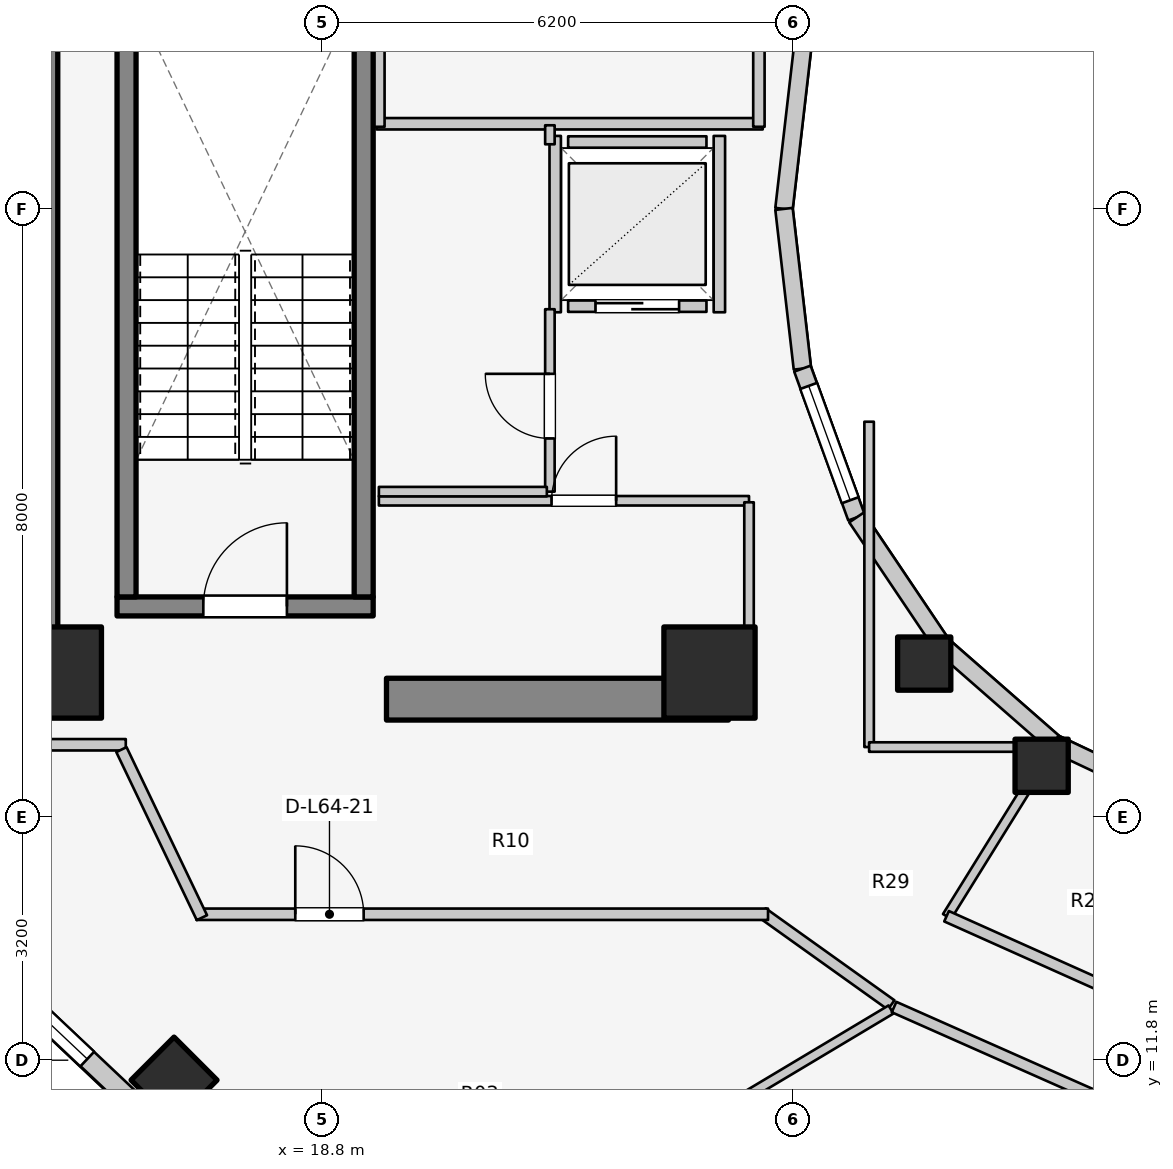
"""IFC4 building model, lengths in metres.
Left out: names, types, materials, properties, quantities, classifications, styles, units other than length and angle.
Written with IfcOpenShell. Run it as: python <this file> out.ifc"""

import sys

from ifc_helpers import new_model, si_unit, direction, frame, frame_2d, origin, origin_2d, place, context, subcontext, project, spatial, rectangle, extrude, element, fill, save


model = new_model("IFC4")
c1 = context("Model", 3, precision=1e-05, world=origin(), true_north=direction((0.0, 1.0)))
c2 = subcontext(c1, "Body", "Model", "MODEL_VIEW")
j1 = project(units=[si_unit("LENGTHUNIT", "METRE"), si_unit("PLANEANGLEUNIT", "RADIAN")], contexts=[c1])
p1 = place(None, origin())
s1 = spatial("IfcSite", under=j1, at=p1, CompositionType="ELEMENT")
p2 = place(p1, origin())
s2 = spatial("IfcBuilding", under=s1, at=p2, CompositionType="ELEMENT")
p3 = place(p2, frame((0.0, 0.0, 210.9)))
s3 = spatial("IfcBuildingStorey", under=s2, at=p3, CompositionType="ELEMENT", Elevation=210.9)
p4 = place(p3, frame((15.05, 17.05, 0.0), z_axis=(0.0, 0.0, 1.0), x_axis=(0.0, 1.0, 0.0)))
e1 = element("IfcWall", 1, at=p4, inside=s3, PredefinedType="SHEAR", context=c2, shape_type="SweptSolid", body=[
    extrude(rectangle(XDim=12.8, YDim=0.55, at=frame_2d((6.4, 0.0))), origin(), (0.0, 0.0, 1.0), 3.1),
])
p5 = place(p3, frame((19.65, 16.55, 0.0), z_axis=(0.0, 0.0, 1.0), x_axis=(1.0, 0.0, 0.0)))
e2 = element("IfcWall", 2, at=p5, inside=s3, PredefinedType="SHEAR", context=c2, shape_type="SweptSolid", body=[
    extrude(rectangle(XDim=4.5, YDim=0.55, at=frame_2d((2.25, 0.0))), origin(), (0.0, 0.0, 1.0), 3.1),
])
p6 = place(p3, frame((16.105, 17.77, 0.0), z_axis=(0.0, 0.0, 1.0), x_axis=(1.0, 0.0, 0.0)))
e3 = element("IfcWall", 3, at=p6, inside=s3, PredefinedType="SOLIDWALL", context=c2, shape_type="SweptSolid", body=[
    extrude(rectangle(XDim=3.37, YDim=0.25, at=frame_2d((1.685, 0.0))), origin(), (0.0, 0.0, 1.0), 3.1),
])
p7 = place(p6, frame((1.135, 0.0, 0.0)))
e4 = element("IfcOpeningElement", 4, at=p7, cuts=e3, PredefinedType="OPENING", context=c2, shape_type="SweptSolid", body=[
    extrude(rectangle(XDim=1.1, YDim=2.1, at=frame_2d((0.55, 1.05))), frame((0.0, 0.135, 0.0), z_axis=(0.0, -1.0, 0.0), x_axis=(1.0, 0.0, 0.0)), (0.0, 0.0, 1.0), 0.27),
])
for number, where, z_axis, x_axis in (
    (5, (16.23, 17.895, 0.0), (0.0, 0.0, 1.0), (0.0, 1.0, 0.0)),
    (6, (19.35, 17.895, 0.0), (0.0, 0.0, 1.0), (0.0, 1.0, 0.0)),
):
    element("IfcWall", number, at=place(p3, frame(where, z_axis=z_axis, x_axis=x_axis)), inside=s3, PredefinedType="SOLIDWALL", context=c2, shape_type="SweptSolid", body=[
        extrude(rectangle(XDim=7.81, YDim=0.25, at=frame_2d((3.905, 0.0))), origin(), (0.0, 0.0, 1.0), 3.1),
    ])
for number, where, z_axis, x_axis in (
    (7, (15.3, 16.9, 0.0), (0.0, 0.0, 1.0), (1.0, 0.0, 0.0)),
    (8, (23.9, 16.9, 0.0), (0.0, 0.0, 1.0), (1.0, 0.0, 0.0)),
):
    element("IfcColumn", number, at=place(p3, frame(where, z_axis=z_axis, x_axis=x_axis)), inside=s3, PredefinedType="COLUMN", context=c2, shape_type="SweptSolid", body=[
        extrude(rectangle(XDim=1.2, YDim=1.2, at=origin_2d()), origin(), (0.0, 0.0, 1.0), 3.1),
    ])
p8 = place(p3, frame((26.725, 17.018, 0.0), z_axis=(0.0, 0.0, 1.0), x_axis=(1.0, 0.0, 0.0)))
e9 = element("IfcColumn", 9, at=p8, inside=s3, PredefinedType="COLUMN", context=c2, shape_type="SweptSolid", body=[
    extrude(rectangle(XDim=0.7, YDim=0.7, at=origin_2d()), origin(), (0.0, 0.0, 1.0), 3.1),
])
p9 = place(p3, frame((16.855, 11.538, 0.0), z_axis=(0.0, 0.0, 1.0), x_axis=(-0.707106781187, -0.707106781187, 0.0)))
e10 = element("IfcColumn", 10, at=p9, inside=s3, PredefinedType="COLUMN", context=c2, shape_type="SweptSolid", body=[
    extrude(rectangle(XDim=0.8, YDim=0.8, at=origin_2d()), origin(), (0.0, 0.0, 1.0), 3.1),
])
p10 = place(p3, frame((28.27, 15.673, 0.0), z_axis=(0.0, 0.0, 1.0), x_axis=(1.0, 0.0, 0.0)))
e11 = element("IfcColumn", 11, at=p10, inside=s3, PredefinedType="COLUMN", context=c2, shape_type="SweptSolid", body=[
    extrude(rectangle(XDim=0.7, YDim=0.7, at=origin_2d()), origin(), (0.0, 0.0, 1.0), 3.1),
])
for number, where, z_axis, x_axis in (
    (12, (25.123, 25.102, 0.0), (0.0, 0.0, 1.0), (-0.115, -0.993, 0.0)),
    (13, (24.88, 23.0, 0.0), (0.0, 0.0, 1.0), (0.115, -0.993, 0.0)),
):
    element("IfcWall", number, at=place(p3, frame(where, z_axis=z_axis, x_axis=x_axis)), inside=s3, PredefinedType="STANDARD", context=c2, shape_type="SweptSolid", body=[
        extrude(rectangle(XDim=2.115, YDim=0.23, at=frame_2d((1.058, 0.0))), origin(), (0.0, 0.0, 1.0), 2.84),
    ])
p11 = place(p3, frame((25.123, 20.898, 0.0), z_axis=(0.0, 0.0, 1.0), x_axis=(0.341423187295, -0.93990968033, 0.0)))
e14 = element("IfcWall", 14, at=p11, inside=s3, PredefinedType="STANDARD", context=c2, shape_type="SweptSolid", body=[
    extrude(rectangle(XDim=2.084, YDim=0.23, at=frame_2d((1.042, 0.0))), origin(), (0.0, 0.0, 1.0), 2.84),
])
p12 = place(p11, frame((0.242, 0.0, 0.85)))
e15 = element("IfcOpeningElement", 15, at=p12, cuts=e14, PredefinedType="OPENING", context=c2, shape_type="SweptSolid", body=[
    extrude(rectangle(XDim=1.6, YDim=1.65, at=frame_2d((0.8, 0.825))), frame((0.0, 0.125, 0.0), z_axis=(0.0, -1.0, 0.0), x_axis=(1.0, 0.0, 0.0)), (0.0, 0.0, 1.0), 0.25),
])
p13 = place(p3, frame((25.834, 18.94, 0.0), z_axis=(0.0, 0.0, 1.0), x_axis=(0.558197800898, -0.829707909492, 0.0)))
e16 = element("IfcWall", 16, at=p13, inside=s3, PredefinedType="STANDARD", context=c2, shape_type="SweptSolid", body=[
    extrude(rectangle(XDim=2.027, YDim=0.23, at=frame_2d((1.013, 0.0))), origin(), (0.0, 0.0, 1.0), 2.16),
])
p14 = place(p3, frame((26.965, 17.258, 0.0), z_axis=(0.0, 0.0, 1.0), x_axis=(0.752576694707, -0.658504607869, 0.0)))
e17 = element("IfcWall", 17, at=p14, inside=s3, PredefinedType="STANDARD", context=c2, shape_type="SweptSolid", body=[
    extrude(rectangle(XDim=1.959, YDim=0.23, at=frame_2d((0.98, 0.0))), origin(), (0.0, 0.0, 1.0), 2.16),
])
p15 = place(p3, frame((28.44, 15.968, 0.0), z_axis=(0.0, 0.0, 1.0), x_axis=(0.904179699603, -0.427152280606, 0.0)))
e18 = element("IfcWall", 18, at=p15, inside=s3, PredefinedType="STANDARD", context=c2, shape_type="SweptSolid", body=[
    extrude(rectangle(XDim=1.899, YDim=0.23, at=frame_2d((0.95, 0.0))), origin(), (0.0, 0.0, 1.0), 2.16),
])
p16 = place(p3, frame((13.239, 14.151, 0.0), z_axis=(0.0, 0.0, 1.0), x_axis=(0.72731899451, -0.686299555752, 0.0)))
e19 = element("IfcWall", 19, at=p16, inside=s3, PredefinedType="STANDARD", context=c2, shape_type="SweptSolid", body=[
    extrude(rectangle(XDim=4.404, YDim=0.26, at=frame_2d((2.202, 0.0))), origin(), (0.0, 0.0, 1.0), 2.85),
])
p17 = place(p16, frame((1.002, 0.0, 0.75)))
e20 = element("IfcOpeningElement", 20, at=p17, cuts=e19, PredefinedType="OPENING", context=c2, shape_type="SweptSolid", body=[
    extrude(rectangle(XDim=2.4, YDim=1.7, at=frame_2d((1.2, 0.85))), frame((0.0, 0.14, 0.0), z_axis=(0.0, -1.0, 0.0), x_axis=(1.0, 0.0, 0.0)), (0.0, 0.0, 1.0), 0.28),
])
p18 = place(p3, frame((22.04, 21.72, 0.0), z_axis=(0.0, 0.0, 1.0), x_axis=(1.0, 0.0, 0.0)))
e21 = element("IfcWall", 21, at=p18, inside=s3, PredefinedType="SOLIDWALL", context=c2, shape_type="SweptSolid", body=[
    extrude(rectangle(XDim=1.82, YDim=0.15, at=frame_2d((0.91, 0.0))), origin(), (0.0, 0.0, 1.0), 2.12),
])
p19 = place(p18, frame((0.36, 0.0, 0.0)))
e22 = element("IfcOpeningElement", 22, at=p19, cuts=e21, PredefinedType="OPENING", context=c2, shape_type="SweptSolid", body=[
    extrude(rectangle(XDim=1.1, YDim=2.1, at=frame_2d((0.55, 1.05))), frame((0.0, 0.085, 0.0), z_axis=(0.0, -1.0, 0.0), x_axis=(1.0, 0.0, 0.0)), (0.0, 0.0, 1.0), 0.17),
])
p20 = place(p3, frame((22.04, 23.88, 0.0), z_axis=(0.0, 0.0, 1.0), x_axis=(1.0, 0.0, 0.0)))
e23 = element("IfcWall", 23, at=p20, inside=s3, PredefinedType="SOLIDWALL", context=c2, shape_type="SweptSolid", body=[
    extrude(rectangle(XDim=1.82, YDim=0.15, at=frame_2d((0.91, 0.0))), origin(), (0.0, 0.0, 1.0), 2.12),
])
p21 = place(p3, frame((21.87, 21.64, 0.0), z_axis=(0.0, 0.0, 1.0), x_axis=(0.0, 1.0, 0.0)))
e24 = element("IfcWall", 24, at=p21, inside=s3, PredefinedType="SOLIDWALL", context=c2, shape_type="SweptSolid", body=[
    extrude(rectangle(XDim=2.32, YDim=0.15, at=frame_2d((1.16, 0.0))), origin(), (0.0, 0.0, 1.0), 2.855),
])
p22 = place(p3, frame((24.03, 21.64, 0.0), z_axis=(0.0, 0.0, 1.0), x_axis=(0.0, 1.0, 0.0)))
e25 = element("IfcWall", 25, at=p22, inside=s3, PredefinedType="SOLIDWALL", context=c2, shape_type="SweptSolid", body=[
    extrude(rectangle(XDim=2.32, YDim=0.15, at=frame_2d((1.16, 0.0))), origin(), (0.0, 0.0, 1.0), 2.12),
])
p23 = place(p3, frame((19.52, 24.12, 0.0), z_axis=(0.0, 0.0, 1.0), x_axis=(1.0, 0.0, 0.0)))
e26 = element("IfcWall", 26, at=p23, inside=s3, PredefinedType="PARTITIONING", context=c2, shape_type="SweptSolid", body=[
    extrude(rectangle(XDim=5.08, YDim=0.15, at=frame_2d((2.54, 0.0))), origin(), (0.0, 0.0, 1.0), 2.12),
])
p24 = place(p3, frame((19.55, 24.08, 0.0), z_axis=(0.0, 0.0, 1.0), x_axis=(0.0, 1.0, 0.0)))
e27 = element("IfcWall", 27, at=p24, inside=s3, PredefinedType="PARTITIONING", context=c2, shape_type="SweptSolid", body=[
    extrude(rectangle(XDim=3.2, YDim=0.15, at=frame_2d((1.6, 0.0))), origin(), (0.0, 0.0, 1.0), 2.855),
])
p25 = place(p3, frame((24.55, 24.08, 0.0), z_axis=(0.0, 0.0, 1.0), x_axis=(0.0, 1.0, 0.0)))
e28 = element("IfcWall", 28, at=p25, inside=s3, PredefinedType="PARTITIONING", context=c2, shape_type="SweptSolid", body=[
    extrude(rectangle(XDim=3.4, YDim=0.15, at=frame_2d((1.7, 0.0))), origin(), (0.0, 0.0, 1.0), 2.855),
])
p26 = place(p25, frame((1.894, 0.0, 0.0)))
e29 = element("IfcOpeningElement", 29, at=p26, cuts=e28, PredefinedType="OPENING", context=c2, shape_type="SweptSolid", body=[
    extrude(rectangle(XDim=1.1, YDim=2.1, at=frame_2d((0.55, 1.05))), frame((0.0, 0.085, 0.0), z_axis=(0.0, -1.0, 0.0), x_axis=(1.0, 0.0, 0.0)), (0.0, 0.0, 1.0), 0.17),
])
p27 = place(p3, frame((19.55, 19.16, 0.0), z_axis=(0.0, 0.0, 1.0), x_axis=(1.0, 0.0, 0.0)))
e30 = element("IfcWall", 30, at=p27, inside=s3, PredefinedType="PARTITIONING", context=c2, shape_type="SweptSolid", body=[
    extrude(rectangle(XDim=4.87, YDim=0.125, at=frame_2d((2.435, 0.0))), origin(), (0.0, 0.0, 1.0), 2.12),
])
p28 = place(p27, frame((2.272, 0.0, 0.0)))
e31 = element("IfcOpeningElement", 31, at=p28, cuts=e30, PredefinedType="OPENING", context=c2, shape_type="SweptSolid", body=[
    extrude(rectangle(XDim=0.85, YDim=2.05, at=frame_2d((0.425, 1.025))), frame((0.0, 0.073, 0.0), z_axis=(0.0, -1.0, 0.0), x_axis=(1.0, 0.0, 0.0)), (0.0, 0.0, 1.0), 0.145),
])
p29 = place(p3, frame((24.42, 17.1, 0.0), z_axis=(0.0, 0.0, 1.0), x_axis=(0.0, 1.0, 0.0)))
e32 = element("IfcWall", 32, at=p29, inside=s3, PredefinedType="PARTITIONING", context=c2, shape_type="SweptSolid", body=[
    extrude(rectangle(XDim=2.04, YDim=0.125, at=frame_2d((1.02, 0.0))), origin(), (0.0, 0.0, 1.0), 2.232),
])
p30 = place(p3, frame((21.8, 19.28, 0.0), z_axis=(0.0, 0.0, 1.0), x_axis=(0.0, 1.0, 0.0)))
e33 = element("IfcWall", 33, at=p30, inside=s3, PredefinedType="PARTITIONING", context=c2, shape_type="SweptSolid", body=[
    extrude(rectangle(XDim=2.4, YDim=0.125, at=frame_2d((1.2, 0.0))), origin(), (0.0, 0.0, 1.0), 2.855),
])
p31 = place(p30, frame((0.7, 0.0, 0.0)))
e34 = element("IfcOpeningElement", 34, at=p31, cuts=e33, PredefinedType="OPENING", context=c2, shape_type="SweptSolid", body=[
    extrude(rectangle(XDim=0.85, YDim=2.05, at=frame_2d((0.425, 1.025))), frame((0.0, 0.073, 0.0), z_axis=(0.0, -1.0, 0.0), x_axis=(1.0, 0.0, 0.0)), (0.0, 0.0, 1.0), 0.145),
])
p32 = place(p3, frame((21.8, 23.85, 0.0), z_axis=(0.0, 0.0, 1.0), x_axis=(0.0, 1.0, 0.0)))
e35 = element("IfcWall", 35, at=p32, inside=s3, PredefinedType="PARTITIONING", context=c2, shape_type="SweptSolid", body=[
    extrude(rectangle(XDim=0.25, YDim=0.125, at=frame_2d((0.125, 0.0))), origin(), (0.0, 0.0, 1.0), 2.855),
])
p33 = place(p3, frame((19.55, 19.28, 0.0), z_axis=(0.0, 0.0, 1.0), x_axis=(1.0, 0.0, 0.0)))
e36 = element("IfcWall", 36, at=p33, inside=s3, PredefinedType="PARTITIONING", context=c2, shape_type="SweptSolid", body=[
    extrude(rectangle(XDim=2.21, YDim=0.125, at=frame_2d((1.105, 0.0))), origin(), (0.0, 0.0, 1.0), 2.12),
])
p34 = place(p3, frame((28.45, 15.985, 0.0), z_axis=(0.0, 0.0, 1.0), x_axis=(-0.527527080983, -0.849538215049, 0.0)))
e37 = element("IfcWall", 37, at=p34, inside=s3, PredefinedType="PARTITIONING", context=c2, shape_type="SweptSolid", body=[
    extrude(rectangle(XDim=2.701, YDim=0.125, at=frame_2d((1.351, 0.0))), origin(), (0.0, 0.0, 1.0), 2.376),
])
p35 = place(p3, frame((27.019, 13.694, 0.0), z_axis=(0.0, 0.0, 1.0), x_axis=(0.912628408652, -0.408790151203, 0.0)))
e38 = element("IfcWall", 38, at=p35, inside=s3, PredefinedType="PARTITIONING", context=c2, shape_type="SweptSolid", body=[
    extrude(rectangle(XDim=2.638, YDim=0.15, at=frame_2d((1.319, 0.0))), origin(), (0.0, 0.0, 1.0), 2.376),
])
p36 = place(p3, frame((26.0, 15.92, 0.0), z_axis=(0.0, 0.0, 1.0), x_axis=(0.0, 1.0, 0.0)))
e39 = element("IfcWall", 39, at=p36, inside=s3, PredefinedType="PARTITIONING", context=c2, shape_type="SweptSolid", body=[
    extrude(rectangle(XDim=4.28, YDim=0.125, at=frame_2d((2.14, 0.0))), origin(), (0.0, 0.0, 1.0), 2.232),
])
p37 = place(p3, frame((26.0, 15.92, 0.0), z_axis=(0.0, 0.0, 1.0), x_axis=(1.0, 0.0, 0.0)))
e40 = element("IfcWall", 40, at=p37, inside=s3, PredefinedType="PARTITIONING", context=c2, shape_type="SweptSolid", body=[
    extrude(rectangle(XDim=2.6, YDim=0.125, at=frame_2d((1.3, 0.0))), origin(), (0.0, 0.0, 1.0), 2.232),
])
p38 = place(p3, frame((11.98, 15.95, 0.0), z_axis=(0.0, 0.0, 1.0), x_axis=(1.0, 0.0, 0.0)))
e41 = element("IfcWall", 41, at=p38, inside=s3, PredefinedType="PARTITIONING", context=c2, shape_type="SweptSolid", body=[
    extrude(rectangle(XDim=4.24, YDim=0.15, at=frame_2d((2.12, 0.0))), origin(), (0.0, 0.0, 1.0), 2.22),
])
p39 = place(p3, frame((26.29, 12.527, 0.0), z_axis=(0.0, 0.0, 1.0), x_axis=(-0.813780999276, 0.581171648669, 0.0)))
e42 = element("IfcWall", 42, at=p39, inside=s3, PredefinedType="PARTITIONING", context=c2, shape_type="SweptSolid", body=[
    extrude(rectangle(XDim=2.082, YDim=0.15, at=frame_2d((1.041, 0.0))), origin(), (0.0, 0.0, 1.0), 2.376),
])
p40 = place(p3, frame((17.15, 13.72, 0.0), z_axis=(0.0, 0.0, 1.0), x_axis=(1.0, 0.0, 0.0)))
e43 = element("IfcWall", 43, at=p40, inside=s3, PredefinedType="PARTITIONING", context=c2, shape_type="SweptSolid", body=[
    extrude(rectangle(XDim=7.52, YDim=0.15, at=frame_2d((3.76, 0.0))), origin(), (0.0, 0.0, 1.0), 2.376),
])
p41 = place(p40, frame((1.3, 0.0, 0.0)))
e44 = element("IfcOpeningElement", 44, at=p41, cuts=e43, PredefinedType="OPENING", context=c2, shape_type="SweptSolid", body=[
    extrude(rectangle(XDim=0.9, YDim=2.1, at=frame_2d((0.45, 1.05))), frame((0.0, 0.085, 0.0), z_axis=(0.0, -1.0, 0.0), x_axis=(1.0, 0.0, 0.0)), (0.0, 0.0, 1.0), 0.17),
])
p42 = place(p3, frame((17.222, 13.675, 0.0), z_axis=(0.0, 0.0, 1.0), x_axis=(-0.431973389813, 0.901886351207, 0.0)))
e45 = element("IfcWall", 45, at=p42, inside=s3, PredefinedType="PARTITIONING", context=c2, shape_type="SweptSolid", body=[
    extrude(rectangle(XDim=2.452, YDim=0.15, at=frame_2d((1.226, 0.0))), origin(), (0.0, 0.0, 1.0), 2.855),
])
p43 = place(p3, frame((26.288, 12.467, 0.0), z_axis=(0.0, 0.0, 1.0), x_axis=(-0.858332411245, -0.513094018487, 0.0)))
e46 = element("IfcWall", 46, at=p43, inside=s3, PredefinedType="PARTITIONING", context=c2, shape_type="SweptSolid", body=[
    extrude(rectangle(XDim=6.586, YDim=0.125, at=frame_2d((3.293, 0.0))), origin(), (0.0, 0.0, 1.0), 2.376),
])
p44 = place(p3, frame((26.328, 12.499, 0.0), z_axis=(0.0, 0.0, 1.0), x_axis=(0.914139569865, -0.405399613724, 0.0)))
e47 = element("IfcWall", 47, at=p44, inside=s3, PredefinedType="PARTITIONING", context=c2, shape_type="SweptSolid", body=[
    extrude(rectangle(XDim=3.005, YDim=0.15, at=frame_2d((1.502, 0.0))), origin(), (0.0, 0.0, 1.0), 2.376),
])
p45 = place(p12, origin())
e48 = element("IfcWindow", 48, at=p45, inside=s3, PartitioningType="SINGLE_PANEL", PredefinedType="WINDOW", context=c2, shape_type="SweptSolid", body=[
    extrude(rectangle(XDim=1.6, YDim=1.65, at=frame_2d((0.8, 0.825))), frame((0.0, 0.03, 0.0), z_axis=(0.0, -1.0, 0.0), x_axis=(1.0, 0.0, 0.0)), (0.0, 0.0, 1.0), 0.06),
])
fill(e15, e48)
p46 = place(p17, origin())
e49 = element("IfcWindow", 49, at=p46, inside=s3, PartitioningType="SINGLE_PANEL", PredefinedType="WINDOW", context=c2, shape_type="SweptSolid", body=[
    extrude(rectangle(XDim=2.4, YDim=1.7, at=frame_2d((1.2, 0.85))), frame((0.0, 0.03, 0.0), z_axis=(0.0, -1.0, 0.0), x_axis=(1.0, 0.0, 0.0)), (0.0, 0.0, 1.0), 0.06),
])
fill(e20, e49)
p47 = place(p7, origin())
e50 = element("IfcDoor", 50, at=p47, inside=s3, OperationType="SINGLE_SWING_RIGHT", PredefinedType="DOOR", context=c2, shape_type="SweptSolid", body=[
    extrude(rectangle(XDim=1.1, YDim=2.1, at=frame_2d((0.55, 1.05))), frame((0.0, 0.025, 0.0), z_axis=(0.0, -1.0, 0.0), x_axis=(1.0, 0.0, 0.0)), (0.0, 0.0, 1.0), 0.05),
])
fill(e4, e50)
p48 = place(p19, origin())
e51 = element("IfcDoor", 51, at=p48, inside=s3, OperationType="DOUBLE_DOOR_SLIDING", PredefinedType="DOOR", context=c2, shape_type="SweptSolid", body=[
    extrude(rectangle(XDim=1.1, YDim=2.1, at=frame_2d((0.55, 1.05))), frame((0.0, 0.025, 0.0), z_axis=(0.0, -1.0, 0.0), x_axis=(1.0, 0.0, 0.0)), (0.0, 0.0, 1.0), 0.05),
])
fill(e22, e51)
p49 = place(p28, origin())
e52 = element("IfcDoor", 52, at=p49, inside=s3, OperationType="SINGLE_SWING_RIGHT", PredefinedType="DOOR", context=c2, shape_type="SweptSolid", body=[
    extrude(rectangle(XDim=0.85, YDim=2.05, at=frame_2d((0.425, 1.025))), frame((0.0, 0.025, 0.0), z_axis=(0.0, -1.0, 0.0), x_axis=(1.0, 0.0, 0.0)), (0.0, 0.0, 1.0), 0.05),
])
fill(e31, e52)
p50 = place(p31, origin())
e53 = element("IfcDoor", 53, at=p50, inside=s3, OperationType="SINGLE_SWING_RIGHT", PredefinedType="DOOR", context=c2, shape_type="SweptSolid", body=[
    extrude(rectangle(XDim=0.85, YDim=2.05, at=frame_2d((0.425, 1.025))), frame((0.0, 0.025, 0.0), z_axis=(0.0, -1.0, 0.0), x_axis=(1.0, 0.0, 0.0)), (0.0, 0.0, 1.0), 0.05),
])
fill(e34, e53)
p51 = place(p41, origin())
e54 = element("IfcDoor", 54, at=p51, inside=s3, OperationType="SINGLE_SWING_LEFT", PredefinedType="DOOR", context=c2, shape_type="SweptSolid", body=[
    extrude(rectangle(XDim=0.9, YDim=2.1, at=frame_2d((0.45, 1.05))), frame((0.0, 0.025, 0.0), z_axis=(0.0, -1.0, 0.0), x_axis=(1.0, 0.0, 0.0)), (0.0, 0.0, 1.0), 0.05),
])
fill(e44, e54)
save(model, sys.argv[1])
